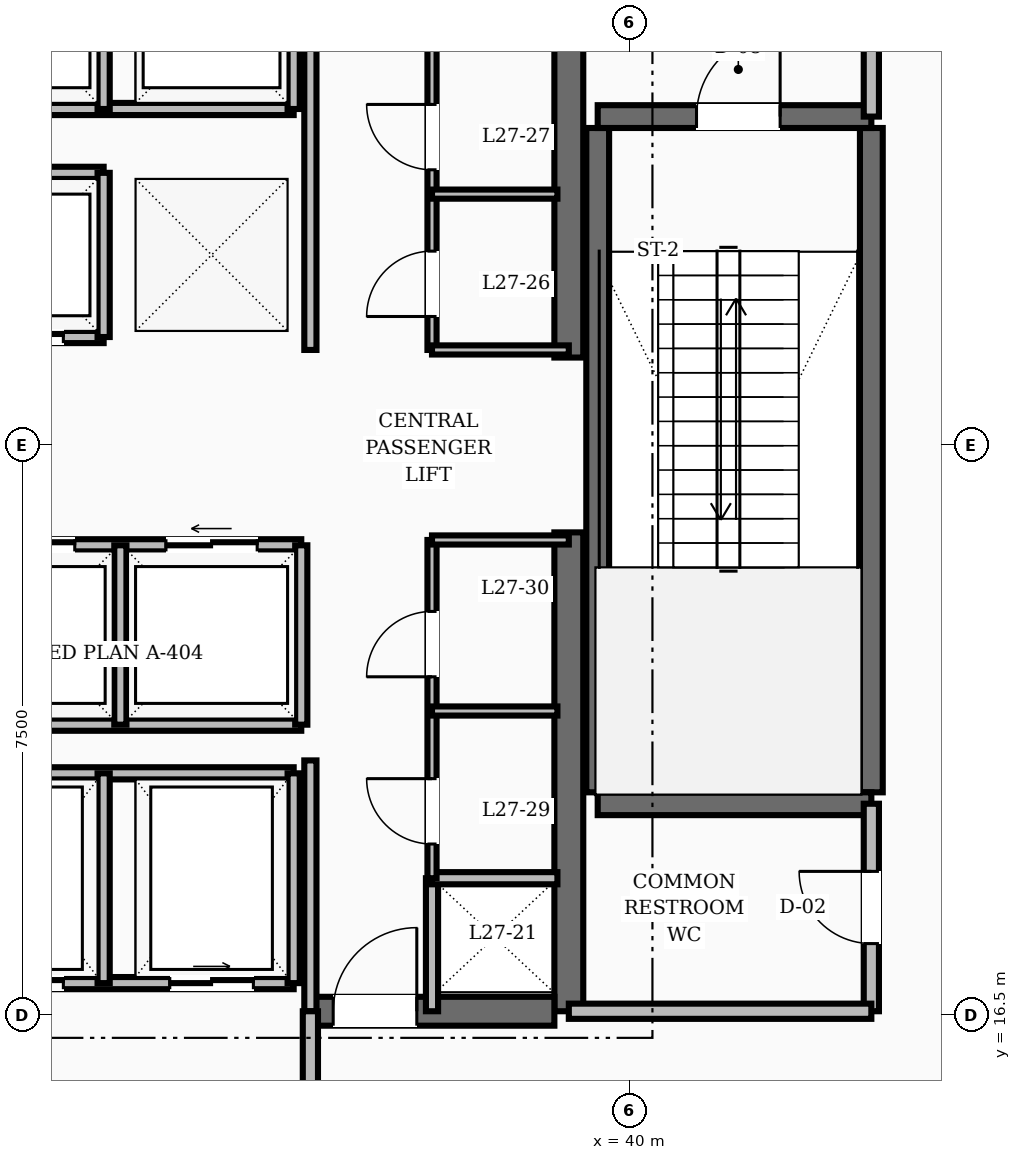
"""IFC4 building model, lengths in metres.
Left out: names, types, materials, properties, quantities, classifications, styles, units other than length and angle.
Written with IfcOpenShell. Run it as: python <this file> out.ifc"""

import sys

from ifc_helpers import new_model, si_unit, direction, frame, frame_2d, origin, place, context, subcontext, project, spatial, rectangle, extrude, element, fill, save


model = new_model("IFC4")
c1 = context("Model", 3, precision=1e-05, world=origin(), true_north=direction((0.0, 1.0)))
c2 = subcontext(c1, "Body", "Model", "MODEL_VIEW")
j1 = project(units=[si_unit("LENGTHUNIT", "METRE"), si_unit("PLANEANGLEUNIT", "RADIAN")], contexts=[c1])
p1 = place(None, origin())
s1 = spatial("IfcSite", under=j1, at=p1, CompositionType="ELEMENT")
p2 = place(p1, origin())
s2 = spatial("IfcBuilding", under=s1, at=p2, CompositionType="ELEMENT")
p3 = place(p2, frame((0.0, 0.0, 106.0)))
s3 = spatial("IfcBuildingStorey", under=s2, at=p3, CompositionType="ELEMENT", Elevation=106.0)
for number, where, z_axis, x_axis in (
    (1, (39.2, 16.55, 0.0), (0.0, 0.0, 1.0), (0.0, 1.0, 0.0)),
    (2, (39.2, 25.15, 0.0), (0.0, 0.0, 1.0), (0.0, 1.0, 0.0)),
):
    element("IfcWall", number, at=place(p3, frame(where, z_axis=z_axis, x_axis=x_axis)), inside=s3, PredefinedType="SHEAR", context=c2, shape_type="SweptSolid", body=[
        extrude(rectangle(XDim=6.3, YDim=0.38, at=frame_2d((3.15, 0.0))), origin(), (0.0, 0.0, 1.0), 4.8),
    ])
p4 = place(p3, frame((35.8, 16.55, 0.0), z_axis=(0.0, 0.0, 1.0), x_axis=(1.0, 0.0, 0.0)))
e3 = element("IfcWall", 3, at=p4, inside=s3, PredefinedType="SHEAR", context=c2, shape_type="SweptSolid", body=[
    extrude(rectangle(XDim=3.21, YDim=0.38, at=frame_2d((1.605, 0.0))), origin(), (0.0, 0.0, 1.0), 4.8),
])
p5 = place(p4, frame((0.3, 0.0, 0.0)))
e4 = element("IfcOpeningElement", 4, at=p5, cuts=e3, PredefinedType="OPENING", context=c2, shape_type="SweptSolid", body=[
    extrude(rectangle(XDim=1.1, YDim=2.1, at=frame_2d((0.55, 1.05))), frame((0.0, 0.2, 0.0), z_axis=(0.0, -1.0, 0.0), x_axis=(1.0, 0.0, 0.0)), (0.0, 0.0, 1.0), 0.4),
])
for number, where, z_axis, x_axis in (
    (5, (43.18, 19.43, 0.0), (0.0, 0.0, 1.0), (0.0, 1.0, 0.0)),
    (6, (39.58, 19.43, 0.0), (0.0, 0.0, 1.0), (0.0, 1.0, 0.0)),
):
    element("IfcWall", number, at=place(p3, frame(where, z_axis=z_axis, x_axis=x_axis)), inside=s3, PredefinedType="SHEAR", context=c2, shape_type="SweptSolid", body=[
        extrude(rectangle(XDim=8.74, YDim=0.3, at=frame_2d((4.37, 0.0))), origin(), (0.0, 0.0, 1.0), 4.8),
    ])
p6 = place(p3, frame((39.58, 19.28, 0.0), z_axis=(0.0, 0.0, 1.0), x_axis=(1.0, 0.0, 0.0)))
e7 = element("IfcWall", 7, at=p6, inside=s3, PredefinedType="SHEAR", context=c2, shape_type="SweptSolid", body=[
    extrude(rectangle(XDim=3.6, YDim=0.3, at=frame_2d((1.8, 0.0))), origin(), (0.0, 0.0, 1.0), 4.8),
])
p7 = place(p3, frame((39.58, 28.32, 0.0), z_axis=(0.0, 0.0, 1.0), x_axis=(1.0, 0.0, 0.0)))
e8 = element("IfcWall", 8, at=p7, inside=s3, PredefinedType="SHEAR", context=c2, shape_type="SweptSolid", body=[
    extrude(rectangle(XDim=3.6, YDim=0.3, at=frame_2d((1.8, 0.0))), origin(), (0.0, 0.0, 1.0), 4.8),
])
p8 = place(p7, frame((1.3, 0.0, 0.0)))
e9 = element("IfcOpeningElement", 9, at=p8, cuts=e8, PredefinedType="OPENING", context=c2, shape_type="SweptSolid", body=[
    extrude(rectangle(XDim=1.1, YDim=2.1, at=frame_2d((0.55, 1.05))), frame((0.0, 0.16, 0.0), z_axis=(0.0, -1.0, 0.0), x_axis=(1.0, 0.0, 0.0)), (0.0, 0.0, 1.0), 0.32),
])
p9 = place(p3, frame((43.18, 28.32, 0.0), z_axis=(0.0, 0.0, 1.0), x_axis=(0.0, 1.0, 0.0)))
e10 = element("IfcWall", 10, at=p9, inside=s3, PredefinedType="SOLIDWALL", context=c2, shape_type="SweptSolid", body=[
    extrude(rectangle(XDim=3.13, YDim=0.2, at=frame_2d((1.565, 0.0))), origin(), (0.0, 0.0, 1.0), 3.71),
])
p10 = place(p9, frame((1.015, 0.0, 0.0)))
e11 = element("IfcOpeningElement", 11, at=p10, cuts=e10, PredefinedType="OPENING", context=c2, shape_type="SweptSolid", body=[
    extrude(rectangle(XDim=1.1, YDim=2.1, at=frame_2d((0.55, 1.05))), frame((0.0, 0.11, 0.0), z_axis=(0.0, -1.0, 0.0), x_axis=(1.0, 0.0, 0.0)), (0.0, 0.0, 1.0), 0.22),
])
p11 = place(p3, frame((43.18, 16.55, 0.0), z_axis=(0.0, 0.0, 1.0), x_axis=(0.0, 1.0, 0.0)))
e12 = element("IfcWall", 12, at=p11, inside=s3, PredefinedType="SOLIDWALL", context=c2, shape_type="SweptSolid", body=[
    extrude(rectangle(XDim=2.73, YDim=0.2, at=frame_2d((1.365, 0.0))), origin(), (0.0, 0.0, 1.0), 3.71),
])
p12 = place(p11, frame((0.89, 0.0, 0.0)))
e13 = element("IfcOpeningElement", 13, at=p12, cuts=e12, PredefinedType="OPENING", context=c2, shape_type="SweptSolid", body=[
    extrude(rectangle(XDim=0.95, YDim=2.1, at=frame_2d((0.475, 1.05))), frame((0.0, 0.11, 0.0), z_axis=(0.0, -1.0, 0.0), x_axis=(1.0, 0.0, 0.0)), (0.0, 0.0, 1.0), 0.22),
])
p13 = place(p3, frame((39.2, 16.55, 0.0), z_axis=(0.0, 0.0, 1.0), x_axis=(1.0, 0.0, 0.0)))
e14 = element("IfcWall", 14, at=p13, inside=s3, PredefinedType="SOLIDWALL", context=c2, shape_type="SweptSolid", body=[
    extrude(rectangle(XDim=3.98, YDim=0.2, at=frame_2d((1.99, 0.0))), origin(), (0.0, 0.0, 1.0), 3.71),
])
p14 = place(p3, frame((35.8, 16.55, 0.0), z_axis=(0.0, 0.0, 1.0), x_axis=(0.0, 1.0, 0.0)))
e15 = element("IfcWall", 15, at=p14, inside=s3, PredefinedType="SOLIDWALL", context=c2, shape_type="SweptSolid", body=[
    extrude(rectangle(XDim=3.3, YDim=0.16, at=frame_2d((1.65, 0.0))), origin(), (0.0, 0.0, 1.0), 3.71),
])
p15 = place(p3, frame((37.4, 16.55, 0.0), z_axis=(0.0, 0.0, 1.0), x_axis=(0.0, 1.0, 0.0)))
e16 = element("IfcWall", 16, at=p15, inside=s3, PredefinedType="SOLIDWALL", context=c2, shape_type="SweptSolid", body=[
    extrude(rectangle(XDim=1.75, YDim=0.16, at=frame_2d((0.875, 0.0))), origin(), (0.0, 0.0, 1.0), 3.71),
])
p16 = place(p3, frame((35.8, 25.25, 0.0), z_axis=(0.0, 0.0, 1.0), x_axis=(0.0, 1.0, 0.0)))
e17 = element("IfcWall", 17, at=p16, inside=s3, PredefinedType="SOLIDWALL", context=c2, shape_type="SweptSolid", body=[
    extrude(rectangle(XDim=6.2, YDim=0.16, at=frame_2d((3.1, 0.0))), origin(), (0.0, 0.0, 1.0), 3.71),
])
p17 = place(p3, frame((35.8, 14.35, 0.0), z_axis=(0.0, 0.0, 1.0), x_axis=(0.0, 1.0, 0.0)))
e18 = element("IfcWall", 18, at=p17, inside=s3, PredefinedType="SOLIDWALL", context=c2, shape_type="SweptSolid", body=[
    extrude(rectangle(XDim=2.2, YDim=0.2, at=frame_2d((1.1, 0.0))), origin(), (0.0, 0.0, 1.0), 3.71),
])
p18 = place(p3, frame((28.42, 28.42, 0.0), z_axis=(0.0, 0.0, 1.0), x_axis=(1.0, 0.0, 0.0)))
e19 = element("IfcWall", 19, at=p18, inside=s3, PredefinedType="SOLIDWALL", context=c2, shape_type="SweptSolid", body=[
    extrude(rectangle(XDim=7.16, YDim=0.16, at=frame_2d((3.58, 0.0))), origin(), (0.0, 0.0, 1.0), 3.71),
])
for number, where, z_axis, x_axis in (
    (20, (33.08, 28.42, 0.0), (0.0, 0.0, 1.0), (0.0, 1.0, 0.0)),
    (21, (35.58, 28.42, 0.0), (0.0, 0.0, 1.0), (0.0, 1.0, 0.0)),
):
    element("IfcWall", number, at=place(p3, frame(where, z_axis=z_axis, x_axis=x_axis)), inside=s3, PredefinedType="SOLIDWALL", context=c2, shape_type="SweptSolid", body=[
        extrude(rectangle(XDim=2.16, YDim=0.16, at=frame_2d((1.08, 0.0))), origin(), (0.0, 0.0, 1.0), 3.71),
    ])
p19 = place(p3, frame((28.42, 25.42, 0.0), z_axis=(0.0, 0.0, 1.0), x_axis=(1.0, 0.0, 0.0)))
e22 = element("IfcWall", 22, at=p19, inside=s3, PredefinedType="SOLIDWALL", context=c2, shape_type="SweptSolid", body=[
    extrude(rectangle(XDim=4.66, YDim=0.16, at=frame_2d((2.33, 0.0))), origin(), (0.0, 0.0, 1.0), 3.71),
])
p20 = place(p19, frame((0.53, 0.0, 0.0)))
e23 = element("IfcOpeningElement", 23, at=p20, cuts=e22, PredefinedType="OPENING", context=c2, shape_type="SweptSolid", body=[
    extrude(rectangle(XDim=1.1, YDim=2.15, at=frame_2d((0.55, 1.075))), frame((0.0, 0.09, 0.0), z_axis=(0.0, -1.0, 0.0), x_axis=(1.0, 0.0, 0.0)), (0.0, 0.0, 1.0), 0.18),
])
p21 = place(p19, frame((3.03, 0.0, 0.0)))
e24 = element("IfcOpeningElement", 24, at=p21, cuts=e22, PredefinedType="OPENING", context=c2, shape_type="SweptSolid", body=[
    extrude(rectangle(XDim=1.1, YDim=2.15, at=frame_2d((0.55, 1.075))), frame((0.0, 0.09, 0.0), z_axis=(0.0, -1.0, 0.0), x_axis=(1.0, 0.0, 0.0)), (0.0, 0.0, 1.0), 0.18),
])
p22 = place(p3, frame((28.42, 27.58, 0.0), z_axis=(0.0, 0.0, 1.0), x_axis=(1.0, 0.0, 0.0)))
e25 = element("IfcWall", 25, at=p22, inside=s3, PredefinedType="SOLIDWALL", context=c2, shape_type="SweptSolid", body=[
    extrude(rectangle(XDim=4.66, YDim=0.16, at=frame_2d((2.33, 0.0))), origin(), (0.0, 0.0, 1.0), 3.71),
])
p23 = place(p3, frame((33.08, 25.42, 0.0), z_axis=(0.0, 0.0, 1.0), x_axis=(0.0, 1.0, 0.0)))
e26 = element("IfcWall", 26, at=p23, inside=s3, PredefinedType="SOLIDWALL", context=c2, shape_type="SweptSolid", body=[
    extrude(rectangle(XDim=2.16, YDim=0.16, at=frame_2d((1.08, 0.0))), origin(), (0.0, 0.0, 1.0), 3.71),
])
p24 = place(p3, frame((30.92, 22.68, 0.0), z_axis=(0.0, 0.0, 1.0), x_axis=(1.0, 0.0, 0.0)))
e27 = element("IfcWall", 27, at=p24, inside=s3, PredefinedType="SOLIDWALL", context=c2, shape_type="SweptSolid", body=[
    extrude(rectangle(XDim=4.76, YDim=0.16, at=frame_2d((2.38, 0.0))), origin(), (0.0, 0.0, 1.0), 3.71),
])
p25 = place(p24, frame((0.58, 0.0, 0.0)))
e28 = element("IfcOpeningElement", 28, at=p25, cuts=e27, PredefinedType="OPENING", context=c2, shape_type="SweptSolid", body=[
    extrude(rectangle(XDim=1.2, YDim=2.15, at=frame_2d((0.6, 1.075))), frame((0.0, 0.09, 0.0), z_axis=(0.0, -1.0, 0.0), x_axis=(1.0, 0.0, 0.0)), (0.0, 0.0, 1.0), 0.18),
])
p26 = place(p24, frame((2.98, 0.0, 0.0)))
e29 = element("IfcOpeningElement", 29, at=p26, cuts=e27, PredefinedType="OPENING", context=c2, shape_type="SweptSolid", body=[
    extrude(rectangle(XDim=1.2, YDim=2.15, at=frame_2d((0.6, 1.075))), frame((0.0, 0.09, 0.0), z_axis=(0.0, -1.0, 0.0), x_axis=(1.0, 0.0, 0.0)), (0.0, 0.0, 1.0), 0.18),
])
p27 = place(p3, frame((30.92, 20.32, 0.0), z_axis=(0.0, 0.0, 1.0), x_axis=(1.0, 0.0, 0.0)))
e30 = element("IfcWall", 30, at=p27, inside=s3, PredefinedType="SOLIDWALL", context=c2, shape_type="SweptSolid", body=[
    extrude(rectangle(XDim=4.76, YDim=0.16, at=frame_2d((2.38, 0.0))), origin(), (0.0, 0.0, 1.0), 3.71),
])
for number, where, z_axis, x_axis in (
    (31, (33.3, 20.32, 0.0), (0.0, 0.0, 1.0), (0.0, 1.0, 0.0)),
    (32, (35.68, 20.32, 0.0), (0.0, 0.0, 1.0), (0.0, 1.0, 0.0)),
):
    element("IfcWall", number, at=place(p3, frame(where, z_axis=z_axis, x_axis=x_axis)), inside=s3, PredefinedType="SOLIDWALL", context=c2, shape_type="SweptSolid", body=[
        extrude(rectangle(XDim=2.36, YDim=0.16, at=frame_2d((1.18, 0.0))), origin(), (0.0, 0.0, 1.0), 3.71),
    ])
p28 = place(p3, frame((28.42, 16.92, 0.0), z_axis=(0.0, 0.0, 1.0), x_axis=(1.0, 0.0, 0.0)))
e33 = element("IfcWall", 33, at=p28, inside=s3, PredefinedType="SOLIDWALL", context=c2, shape_type="SweptSolid", body=[
    extrude(rectangle(XDim=7.16, YDim=0.16, at=frame_2d((3.58, 0.0))), origin(), (0.0, 0.0, 1.0), 3.71),
])
p29 = place(p28, frame((0.53, 0.0, 0.0)))
e34 = element("IfcOpeningElement", 34, at=p29, cuts=e33, PredefinedType="OPENING", context=c2, shape_type="SweptSolid", body=[
    extrude(rectangle(XDim=1.1, YDim=2.15, at=frame_2d((0.55, 1.075))), frame((0.0, 0.09, 0.0), z_axis=(0.0, -1.0, 0.0), x_axis=(1.0, 0.0, 0.0)), (0.0, 0.0, 1.0), 0.18),
])
p30 = place(p28, frame((3.03, 0.0, 0.0)))
e35 = element("IfcOpeningElement", 35, at=p30, cuts=e33, PredefinedType="OPENING", context=c2, shape_type="SweptSolid", body=[
    extrude(rectangle(XDim=1.1, YDim=2.15, at=frame_2d((0.55, 1.075))), frame((0.0, 0.09, 0.0), z_axis=(0.0, -1.0, 0.0), x_axis=(1.0, 0.0, 0.0)), (0.0, 0.0, 1.0), 0.18),
])
p31 = place(p28, frame((5.53, 0.0, 0.0)))
e36 = element("IfcOpeningElement", 36, at=p31, cuts=e33, PredefinedType="OPENING", context=c2, shape_type="SweptSolid", body=[
    extrude(rectangle(XDim=1.1, YDim=2.15, at=frame_2d((0.55, 1.075))), frame((0.0, 0.09, 0.0), z_axis=(0.0, -1.0, 0.0), x_axis=(1.0, 0.0, 0.0)), (0.0, 0.0, 1.0), 0.18),
])
p32 = place(p3, frame((28.42, 19.68, 0.0), z_axis=(0.0, 0.0, 1.0), x_axis=(1.0, 0.0, 0.0)))
e37 = element("IfcWall", 37, at=p32, inside=s3, PredefinedType="SOLIDWALL", context=c2, shape_type="SweptSolid", body=[
    extrude(rectangle(XDim=7.16, YDim=0.16, at=frame_2d((3.58, 0.0))), origin(), (0.0, 0.0, 1.0), 3.71),
])
for number, where, z_axis, x_axis in (
    (38, (33.08, 16.92, 0.0), (0.0, 0.0, 1.0), (0.0, 1.0, 0.0)),
    (39, (35.58, 16.92, 0.0), (0.0, 0.0, 1.0), (0.0, 1.0, 0.0)),
):
    element("IfcWall", number, at=place(p3, frame(where, z_axis=z_axis, x_axis=x_axis)), inside=s3, PredefinedType="SOLIDWALL", context=c2, shape_type="SweptSolid", body=[
        extrude(rectangle(XDim=2.76, YDim=0.16, at=frame_2d((1.38, 0.0))), origin(), (0.0, 0.0, 1.0), 3.71),
    ])
p33 = place(p3, frame((37.4, 18.3, 0.0), z_axis=(0.0, 0.0, 1.0), x_axis=(1.0, 0.0, 0.0)))
e40 = element("IfcWall", 40, at=p33, inside=s3, PredefinedType="SOLIDWALL", context=c2, shape_type="SweptSolid", body=[
    extrude(rectangle(XDim=1.65, YDim=0.16, at=frame_2d((0.825, 0.0))), origin(), (0.0, 0.0, 1.0), 3.71),
])
p34 = place(p3, frame((37.4, 25.25, 0.0), z_axis=(0.0, 0.0, 1.0), x_axis=(0.0, 1.0, 0.0)))
e41 = element("IfcWall", 41, at=p34, inside=s3, PredefinedType="PARTITIONING", context=c2, shape_type="SweptSolid", body=[
    extrude(rectangle(XDim=6.2, YDim=0.12, at=frame_2d((3.1, 0.0))), origin(), (0.0, 0.0, 1.0), 3.71),
])
p35 = place(p34, frame((0.44, 0.0, 0.0)))
e42 = element("IfcOpeningElement", 42, at=p35, cuts=e41, PredefinedType="OPENING", context=c2, shape_type="SweptSolid", body=[
    extrude(rectangle(XDim=0.86, YDim=2.1, at=frame_2d((0.43, 1.05))), frame((0.0, 0.07, 0.0), z_axis=(0.0, -1.0, 0.0), x_axis=(1.0, 0.0, 0.0)), (0.0, 0.0, 1.0), 0.14),
])
p36 = place(p34, frame((2.37, 0.0, 0.0)))
e43 = element("IfcOpeningElement", 43, at=p36, cuts=e41, PredefinedType="OPENING", context=c2, shape_type="SweptSolid", body=[
    extrude(rectangle(XDim=0.86, YDim=2.1, at=frame_2d((0.43, 1.05))), frame((0.0, 0.07, 0.0), z_axis=(0.0, -1.0, 0.0), x_axis=(1.0, 0.0, 0.0)), (0.0, 0.0, 1.0), 0.14),
])
p37 = place(p34, frame((4.39, 0.0, 0.0)))
e44 = element("IfcOpeningElement", 44, at=p37, cuts=e41, PredefinedType="OPENING", context=c2, shape_type="SweptSolid", body=[
    extrude(rectangle(XDim=0.86, YDim=2.1, at=frame_2d((0.43, 1.05))), frame((0.0, 0.07, 0.0), z_axis=(0.0, -1.0, 0.0), x_axis=(1.0, 0.0, 0.0)), (0.0, 0.0, 1.0), 0.14),
])
p38 = place(p3, frame((37.4, 25.25, 0.0), z_axis=(0.0, 0.0, 1.0), x_axis=(1.0, 0.0, 0.0)))
e45 = element("IfcWall", 45, at=p38, inside=s3, PredefinedType="PARTITIONING", context=c2, shape_type="SweptSolid", body=[
    extrude(rectangle(XDim=1.8, YDim=0.12, at=frame_2d((0.9, 0.0))), origin(), (0.0, 0.0, 1.0), 3.71),
])
p39 = place(p3, frame((37.4, 18.3, 0.0), z_axis=(0.0, 0.0, 1.0), x_axis=(0.0, 1.0, 0.0)))
e46 = element("IfcWall", 46, at=p39, inside=s3, PredefinedType="PARTITIONING", context=c2, shape_type="SweptSolid", body=[
    extrude(rectangle(XDim=4.45, YDim=0.12, at=frame_2d((2.225, 0.0))), origin(), (0.0, 0.0, 1.0), 3.71),
])
p40 = place(p39, frame((0.45, 0.0, 0.0)))
e47 = element("IfcOpeningElement", 47, at=p40, cuts=e46, PredefinedType="OPENING", context=c2, shape_type="SweptSolid", body=[
    extrude(rectangle(XDim=0.86, YDim=2.1, at=frame_2d((0.43, 1.05))), frame((0.0, 0.07, 0.0), z_axis=(0.0, -1.0, 0.0), x_axis=(1.0, 0.0, 0.0)), (0.0, 0.0, 1.0), 0.14),
])
p41 = place(p39, frame((2.65, 0.0, 0.0)))
e48 = element("IfcOpeningElement", 48, at=p41, cuts=e46, PredefinedType="OPENING", context=c2, shape_type="SweptSolid", body=[
    extrude(rectangle(XDim=0.86, YDim=2.1, at=frame_2d((0.43, 1.05))), frame((0.0, 0.07, 0.0), z_axis=(0.0, -1.0, 0.0), x_axis=(1.0, 0.0, 0.0)), (0.0, 0.0, 1.0), 0.14),
])
p42 = place(p3, frame((37.4, 22.75, 0.0), z_axis=(0.0, 0.0, 1.0), x_axis=(1.0, 0.0, 0.0)))
e49 = element("IfcWall", 49, at=p42, inside=s3, PredefinedType="PARTITIONING", context=c2, shape_type="SweptSolid", body=[
    extrude(rectangle(XDim=1.8, YDim=0.12, at=frame_2d((0.9, 0.0))), origin(), (0.0, 0.0, 1.0), 3.71),
])
for number, where, z_axis, x_axis in (
    (50, (37.4, 27.3, 0.0), (0.0, 0.0, 1.0), (1.0, 0.0, 0.0)),
    (51, (37.4, 20.5, 0.0), (0.0, 0.0, 1.0), (1.0, 0.0, 0.0)),
):
    element("IfcWall", number, at=place(p3, frame(where, z_axis=z_axis, x_axis=x_axis)), inside=s3, PredefinedType="PARTITIONING", context=c2, shape_type="SweptSolid", body=[
        extrude(rectangle(XDim=1.65, YDim=0.12, at=frame_2d((0.825, 0.0))), origin(), (0.0, 0.0, 1.0), 3.71),
    ])
p43 = place(p3, frame((42.925, 14.03, 0.0), z_axis=(0.0, 0.0, 1.0), x_axis=(0.668645478294, 0.743581350194, 0.0)))
e52 = element("IfcWall", 52, at=p43, inside=s3, PredefinedType="SOLIDWALL", context=c2, shape_type="SweptSolid", body=[
    extrude(rectangle(XDim=2.874, YDim=0.16, at=frame_2d((1.437, 0.0))), origin(), (0.0, 0.0, 1.0), 3.71),
])
p44 = place(p8, origin())
e53 = element("IfcDoor", 53, at=p44, inside=s3, OperationType="SINGLE_SWING_RIGHT", PredefinedType="DOOR", context=c2, shape_type="SweptSolid", body=[
    extrude(rectangle(XDim=1.1, YDim=2.1, at=frame_2d((0.55, 1.05))), frame((0.0, 0.025, 0.0), z_axis=(0.0, -1.0, 0.0), x_axis=(1.0, 0.0, 0.0)), (0.0, 0.0, 1.0), 0.05),
])
fill(e9, e53)
p45 = place(p12, origin())
e54 = element("IfcDoor", 54, at=p45, inside=s3, OperationType="SINGLE_SWING_RIGHT", PredefinedType="DOOR", context=c2, shape_type="SweptSolid", body=[
    extrude(rectangle(XDim=0.95, YDim=2.1, at=frame_2d((0.475, 1.05))), frame((0.0, 0.025, 0.0), z_axis=(0.0, -1.0, 0.0), x_axis=(1.0, 0.0, 0.0)), (0.0, 0.0, 1.0), 0.05),
])
fill(e13, e54)
p46 = place(p5, origin())
e55 = element("IfcDoor", 55, at=p46, inside=s3, OperationType="SINGLE_SWING_RIGHT", PredefinedType="DOOR", context=c2, shape_type="SweptSolid", body=[
    extrude(rectangle(XDim=1.1, YDim=2.1, at=frame_2d((0.55, 1.05))), frame((0.0, 0.025, 0.0), z_axis=(0.0, -1.0, 0.0), x_axis=(1.0, 0.0, 0.0)), (0.0, 0.0, 1.0), 0.05),
])
fill(e4, e55)
p47 = place(p21, origin())
e56 = element("IfcDoor", 56, at=p47, inside=s3, OperationType="SLIDING_TO_RIGHT", PredefinedType="DOOR", context=c2, shape_type="SweptSolid", body=[
    extrude(rectangle(XDim=1.1, YDim=2.15, at=frame_2d((0.55, 1.075))), frame((0.0, 0.025, 0.0), z_axis=(0.0, -1.0, 0.0), x_axis=(1.0, 0.0, 0.0)), (0.0, 0.0, 1.0), 0.05),
])
fill(e24, e56)
p48 = place(p25, origin())
e57 = element("IfcDoor", 57, at=p48, inside=s3, OperationType="SLIDING_TO_LEFT", PredefinedType="DOOR", context=c2, shape_type="SweptSolid", body=[
    extrude(rectangle(XDim=1.2, YDim=2.15, at=frame_2d((0.6, 1.075))), frame((0.0, 0.025, 0.0), z_axis=(0.0, -1.0, 0.0), x_axis=(1.0, 0.0, 0.0)), (0.0, 0.0, 1.0), 0.05),
])
fill(e28, e57)
p49 = place(p26, origin())
e58 = element("IfcDoor", 58, at=p49, inside=s3, OperationType="SLIDING_TO_LEFT", PredefinedType="DOOR", context=c2, shape_type="SweptSolid", body=[
    extrude(rectangle(XDim=1.2, YDim=2.15, at=frame_2d((0.6, 1.075))), frame((0.0, 0.025, 0.0), z_axis=(0.0, -1.0, 0.0), x_axis=(1.0, 0.0, 0.0)), (0.0, 0.0, 1.0), 0.05),
])
fill(e29, e58)
p50 = place(p30, origin())
e59 = element("IfcDoor", 59, at=p50, inside=s3, OperationType="SLIDING_TO_RIGHT", PredefinedType="DOOR", context=c2, shape_type="SweptSolid", body=[
    extrude(rectangle(XDim=1.1, YDim=2.15, at=frame_2d((0.55, 1.075))), frame((0.0, 0.025, 0.0), z_axis=(0.0, -1.0, 0.0), x_axis=(1.0, 0.0, 0.0)), (0.0, 0.0, 1.0), 0.05),
])
fill(e35, e59)
p51 = place(p31, origin())
e60 = element("IfcDoor", 60, at=p51, inside=s3, OperationType="SLIDING_TO_RIGHT", PredefinedType="DOOR", context=c2, shape_type="SweptSolid", body=[
    extrude(rectangle(XDim=1.1, YDim=2.15, at=frame_2d((0.55, 1.075))), frame((0.0, 0.025, 0.0), z_axis=(0.0, -1.0, 0.0), x_axis=(1.0, 0.0, 0.0)), (0.0, 0.0, 1.0), 0.05),
])
fill(e36, e60)
p52 = place(p35, origin())
e61 = element("IfcDoor", 61, at=p52, inside=s3, OperationType="SINGLE_SWING_LEFT", PredefinedType="DOOR", context=c2, shape_type="SweptSolid", body=[
    extrude(rectangle(XDim=0.86, YDim=2.1, at=frame_2d((0.43, 1.05))), frame((0.0, 0.025, 0.0), z_axis=(0.0, -1.0, 0.0), x_axis=(1.0, 0.0, 0.0)), (0.0, 0.0, 1.0), 0.05),
])
fill(e42, e61)
p53 = place(p36, origin())
e62 = element("IfcDoor", 62, at=p53, inside=s3, OperationType="SINGLE_SWING_RIGHT", PredefinedType="DOOR", context=c2, shape_type="SweptSolid", body=[
    extrude(rectangle(XDim=0.86, YDim=2.1, at=frame_2d((0.43, 1.05))), frame((0.0, 0.025, 0.0), z_axis=(0.0, -1.0, 0.0), x_axis=(1.0, 0.0, 0.0)), (0.0, 0.0, 1.0), 0.05),
])
fill(e43, e62)
p54 = place(p40, origin())
e63 = element("IfcDoor", 63, at=p54, inside=s3, OperationType="SINGLE_SWING_RIGHT", PredefinedType="DOOR", context=c2, shape_type="SweptSolid", body=[
    extrude(rectangle(XDim=0.86, YDim=2.1, at=frame_2d((0.43, 1.05))), frame((0.0, 0.025, 0.0), z_axis=(0.0, -1.0, 0.0), x_axis=(1.0, 0.0, 0.0)), (0.0, 0.0, 1.0), 0.05),
])
fill(e47, e63)
p55 = place(p41, origin())
e64 = element("IfcDoor", 64, at=p55, inside=s3, OperationType="SINGLE_SWING_LEFT", PredefinedType="DOOR", context=c2, shape_type="SweptSolid", body=[
    extrude(rectangle(XDim=0.86, YDim=2.1, at=frame_2d((0.43, 1.05))), frame((0.0, 0.025, 0.0), z_axis=(0.0, -1.0, 0.0), x_axis=(1.0, 0.0, 0.0)), (0.0, 0.0, 1.0), 0.05),
])
fill(e48, e64)
save(model, sys.argv[1])
